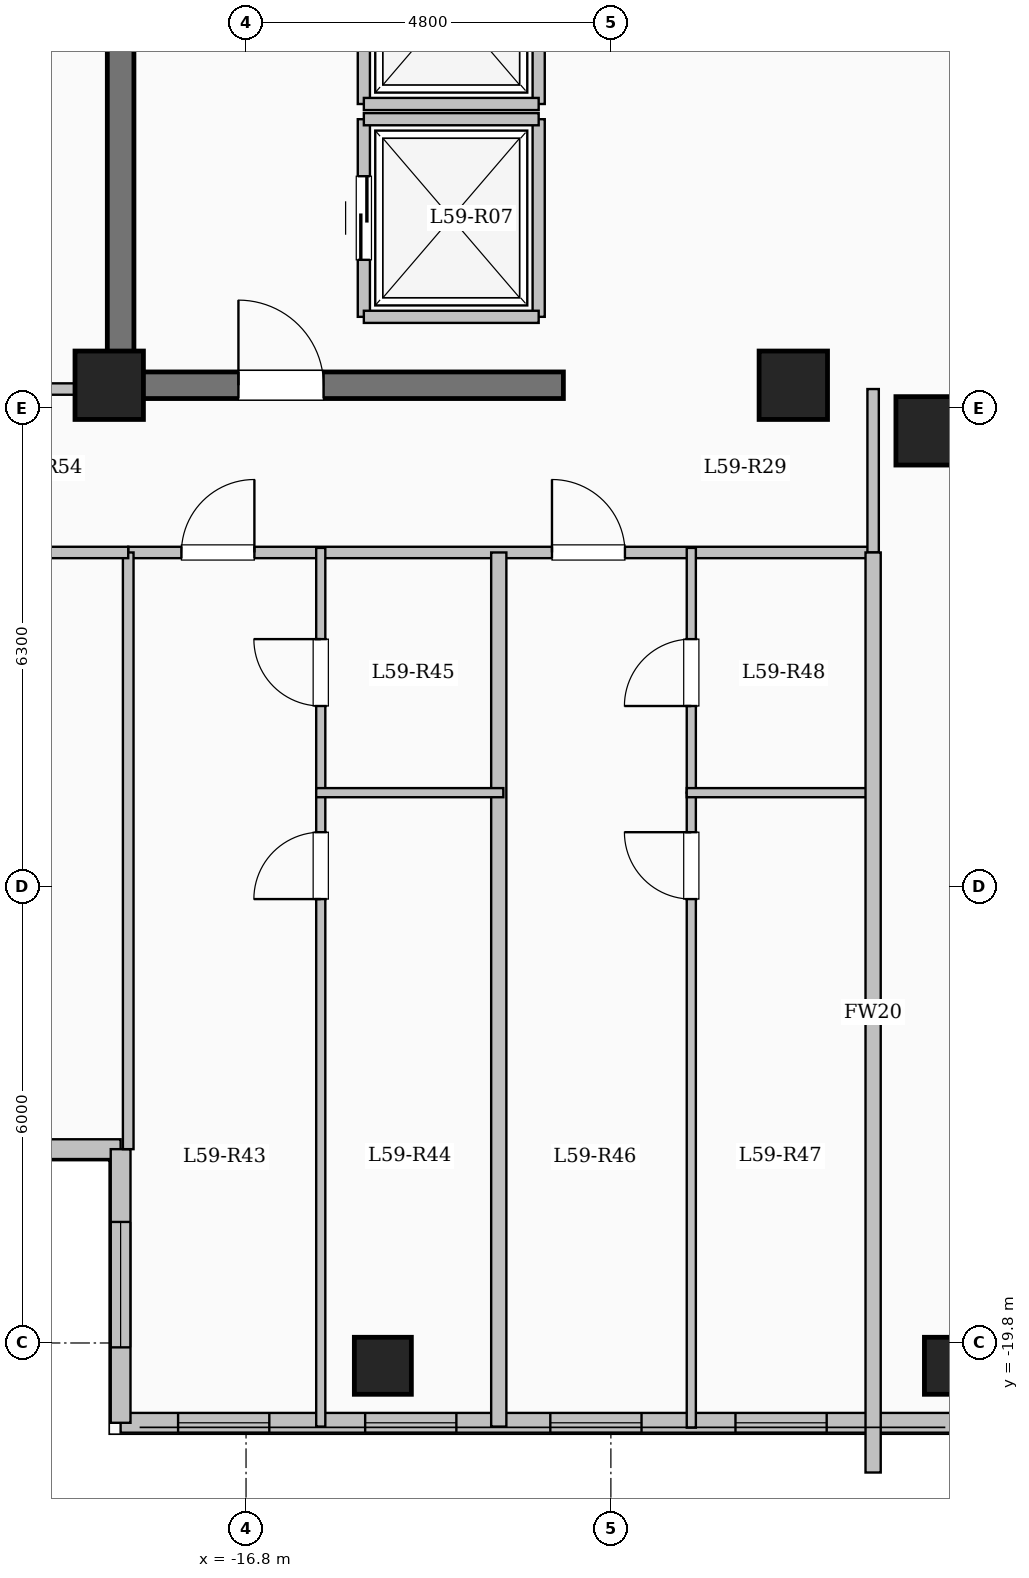
"""IFC4 building model, lengths in metres.
Left out: names, types, materials, properties, quantities, classifications, styles, units other than length and angle.
Written with IfcOpenShell. Run it as: python <this file> out.ifc"""

import sys

from ifc_helpers import new_model, si_unit, direction, frame, frame_2d, origin, origin_2d, place, context, subcontext, project, spatial, rectangle, extrude, element, fill, save


model = new_model("IFC4")
c1 = context("Model", 3, precision=1e-05, world=origin(), true_north=direction((0.0, 1.0)))
c2 = subcontext(c1, "Body", "Model", "MODEL_VIEW")
j1 = project(units=[si_unit("LENGTHUNIT", "METRE"), si_unit("PLANEANGLEUNIT", "RADIAN")], contexts=[c1])
p1 = place(None, origin())
s1 = spatial("IfcSite", under=j1, at=p1, CompositionType="ELEMENT")
p2 = place(p1, origin())
s2 = spatial("IfcBuilding", under=s1, at=p2, CompositionType="ELEMENT")
p3 = place(p2, frame((0.0, 0.0, 217.05)))
s3 = spatial("IfcBuildingStorey", under=s2, at=p3, CompositionType="ELEMENT", Elevation=217.05)
for number, where, z_axis, x_axis in (
    (1, (-7.8, -7.8, 0.0), (0.0, 0.0, 1.0), (1.0, 0.0, 0.0)),
    (2, (-9.6, -7.2, 0.0), (0.0, 0.0, 1.0), (1.0, 0.0, 0.0)),
    (3, (-18.6, -7.2, 0.0), (0.0, 0.0, 1.0), (1.0, 0.0, 0.0)),
):
    element("IfcColumn", number, at=place(p3, frame(where, z_axis=z_axis, x_axis=x_axis)), inside=s3, PredefinedType="COLUMN", context=c2, shape_type="SweptSolid", body=[
        extrude(rectangle(XDim=0.9, YDim=0.9, at=origin_2d()), origin(), (0.0, 0.0, 1.0), 3.35),
    ])
for number, where, z_axis, x_axis in (
    (4, (-15.0, -20.1, 0.0), (0.0, 0.0, 1.0), (1.0, 0.0, 0.0)),
    (5, (-7.5, -20.1, 0.0), (0.0, 0.0, 1.0), (1.0, 0.0, 0.0)),
):
    element("IfcColumn", number, at=place(p3, frame(where, z_axis=z_axis, x_axis=x_axis)), inside=s3, PredefinedType="COLUMN", context=c2, shape_type="SweptSolid", body=[
        extrude(rectangle(XDim=0.75, YDim=0.75, at=origin_2d()), origin(), (0.0, 0.0, 1.0), 3.35),
    ])
p4 = place(p3, frame((-18.45, -17.25, 0.0), z_axis=(0.0, 0.0, 1.0), x_axis=(-1.0, 0.0, 0.0)))
e6 = element("IfcWall", 6, at=p4, inside=s3, PredefinedType="SOLIDWALL", context=c2, shape_type="SweptSolid", body=[
    extrude(rectangle(XDim=5.1, YDim=0.26, at=frame_2d((2.55, 0.0))), origin(), (0.0, 0.0, 1.0), 3.1),
])
p5 = place(p4, frame((1.425, 0.0, 0.9)))
e7 = element("IfcOpeningElement", 7, at=p5, cuts=e6, PredefinedType="OPENING", context=c2, shape_type="SweptSolid", body=[
    extrude(rectangle(XDim=2.2, YDim=1.75, at=frame_2d((1.1, 0.875))), frame((0.0, 0.14, 0.0), z_axis=(0.0, -1.0, 0.0), x_axis=(1.0, 0.0, 0.0)), (0.0, 0.0, 1.0), 0.28),
])
p6 = place(p3, frame((-7.35, -20.85, 0.0), z_axis=(0.0, 0.0, 1.0), x_axis=(-1.0, 0.0, 0.0)))
e8 = element("IfcWall", 8, at=p6, inside=s3, PredefinedType="SOLIDWALL", context=c2, shape_type="SweptSolid", body=[
    extrude(rectangle(XDim=11.1, YDim=0.26, at=frame_2d((5.55, 0.0))), origin(), (0.0, 0.0, 1.0), 3.1),
])
p7 = place(p6, frame((1.811, 0.0, 0.95)))
e9 = element("IfcOpeningElement", 9, at=p7, cuts=e8, PredefinedType="OPENING", context=c2, shape_type="SweptSolid", body=[
    extrude(rectangle(XDim=1.2, YDim=1.5, at=frame_2d((0.6, 0.75))), frame((0.0, 0.14, 0.0), z_axis=(0.0, -1.0, 0.0), x_axis=(1.0, 0.0, 0.0)), (0.0, 0.0, 1.0), 0.28),
])
p8 = place(p6, frame((4.247, 0.0, 0.95)))
e10 = element("IfcOpeningElement", 10, at=p8, cuts=e8, PredefinedType="OPENING", context=c2, shape_type="SweptSolid", body=[
    extrude(rectangle(XDim=1.2, YDim=1.5, at=frame_2d((0.6, 0.75))), frame((0.0, 0.14, 0.0), z_axis=(0.0, -1.0, 0.0), x_axis=(1.0, 0.0, 0.0)), (0.0, 0.0, 1.0), 0.28),
])
p9 = place(p6, frame((6.683, 0.0, 0.95)))
e11 = element("IfcOpeningElement", 11, at=p9, cuts=e8, PredefinedType="OPENING", context=c2, shape_type="SweptSolid", body=[
    extrude(rectangle(XDim=1.2, YDim=1.5, at=frame_2d((0.6, 0.75))), frame((0.0, 0.14, 0.0), z_axis=(0.0, -1.0, 0.0), x_axis=(1.0, 0.0, 0.0)), (0.0, 0.0, 1.0), 0.28),
])
p10 = place(p6, frame((9.144, 0.0, 0.95)))
e12 = element("IfcOpeningElement", 12, at=p10, cuts=e8, PredefinedType="OPENING", context=c2, shape_type="SweptSolid", body=[
    extrude(rectangle(XDim=1.2, YDim=1.5, at=frame_2d((0.6, 0.75))), frame((0.0, 0.14, 0.0), z_axis=(0.0, -1.0, 0.0), x_axis=(1.0, 0.0, 0.0)), (0.0, 0.0, 1.0), 0.28),
])
p11 = place(p3, frame((-18.45, -20.85, 0.0), z_axis=(0.0, 0.0, 1.0), x_axis=(0.0, 1.0, 0.0)))
e13 = element("IfcWall", 13, at=p11, inside=s3, PredefinedType="SOLIDWALL", context=c2, shape_type="SweptSolid", body=[
    extrude(rectangle(XDim=3.6, YDim=0.26, at=frame_2d((1.8, 0.0))), origin(), (0.0, 0.0, 1.0), 3.1),
])
p12 = place(p11, frame((0.992, 0.0, 0.9)))
e14 = element("IfcOpeningElement", 14, at=p12, cuts=e13, PredefinedType="OPENING", context=c2, shape_type="SweptSolid", body=[
    extrude(rectangle(XDim=1.65, YDim=1.6, at=frame_2d((0.825, 0.8))), frame((0.0, 0.14, 0.0), z_axis=(0.0, -1.0, 0.0), x_axis=(1.0, 0.0, 0.0)), (0.0, 0.0, 1.0), 0.28),
])
p13 = place(p3, frame((-15.25, -6.3, 0.0), z_axis=(0.0, 0.0, 1.0), x_axis=(0.0, 1.0, 0.0)))
e15 = element("IfcWall", 15, at=p13, inside=s3, PredefinedType="SOLIDWALL", context=c2, shape_type="SweptSolid", body=[
    extrude(rectangle(XDim=2.6, YDim=0.16, at=frame_2d((1.3, 0.0))), origin(), (0.0, 0.0, 1.0), 3.1),
])
p14 = place(p13, frame((0.75, 0.0, 0.0)))
e16 = element("IfcOpeningElement", 16, at=p14, cuts=e15, PredefinedType="OPENING", context=c2, shape_type="SweptSolid", body=[
    extrude(rectangle(XDim=1.1, YDim=2.15, at=frame_2d((0.55, 1.075))), frame((0.0, 0.09, 0.0), z_axis=(0.0, -1.0, 0.0), x_axis=(1.0, 0.0, 0.0)), (0.0, 0.0, 1.0), 0.18),
])
p15 = place(p3, frame((-12.95, -6.3, 0.0), z_axis=(0.0, 0.0, 1.0), x_axis=(0.0, 1.0, 0.0)))
e17 = element("IfcWall", 17, at=p15, inside=s3, PredefinedType="SOLIDWALL", context=c2, shape_type="SweptSolid", body=[
    extrude(rectangle(XDim=2.6, YDim=0.16, at=frame_2d((1.3, 0.0))), origin(), (0.0, 0.0, 1.0), 3.1),
])
for number, where, z_axis, x_axis in (
    (18, (-15.25, -6.3, 0.0), (0.0, 0.0, 1.0), (1.0, 0.0, 0.0)),
    (19, (-15.25, -3.7, 0.0), (0.0, 0.0, 1.0), (1.0, 0.0, 0.0)),
):
    element("IfcWall", number, at=place(p3, frame(where, z_axis=z_axis, x_axis=x_axis)), inside=s3, PredefinedType="SOLIDWALL", context=c2, shape_type="SweptSolid", body=[
        extrude(rectangle(XDim=2.3, YDim=0.16, at=frame_2d((1.15, 0.0))), origin(), (0.0, 0.0, 1.0), 3.1),
    ])
p16 = place(p3, frame((-15.25, -3.5, 0.0), z_axis=(0.0, 0.0, 1.0), x_axis=(0.0, 1.0, 0.0)))
e20 = element("IfcWall", 20, at=p16, inside=s3, PredefinedType="SOLIDWALL", context=c2, shape_type="SweptSolid", body=[
    extrude(rectangle(XDim=2.6, YDim=0.16, at=frame_2d((1.3, 0.0))), origin(), (0.0, 0.0, 1.0), 3.1),
])
p17 = place(p16, frame((0.75, 0.0, 0.0)))
e21 = element("IfcOpeningElement", 21, at=p17, cuts=e20, PredefinedType="OPENING", context=c2, shape_type="SweptSolid", body=[
    extrude(rectangle(XDim=1.1, YDim=2.15, at=frame_2d((0.55, 1.075))), frame((0.0, 0.09, 0.0), z_axis=(0.0, -1.0, 0.0), x_axis=(1.0, 0.0, 0.0)), (0.0, 0.0, 1.0), 0.18),
])
p18 = place(p3, frame((-12.95, -3.5, 0.0), z_axis=(0.0, 0.0, 1.0), x_axis=(0.0, 1.0, 0.0)))
e22 = element("IfcWall", 22, at=p18, inside=s3, PredefinedType="SOLIDWALL", context=c2, shape_type="SweptSolid", body=[
    extrude(rectangle(XDim=2.6, YDim=0.16, at=frame_2d((1.3, 0.0))), origin(), (0.0, 0.0, 1.0), 3.1),
])
p19 = place(p3, frame((-15.25, -3.5, 0.0), z_axis=(0.0, 0.0, 1.0), x_axis=(1.0, 0.0, 0.0)))
e23 = element("IfcWall", 23, at=p19, inside=s3, PredefinedType="SOLIDWALL", context=c2, shape_type="SweptSolid", body=[
    extrude(rectangle(XDim=2.3, YDim=0.16, at=frame_2d((1.15, 0.0))), origin(), (0.0, 0.0, 1.0), 3.1),
])
p20 = place(p3, frame((-18.45, -7.375, 0.0), z_axis=(0.0, 0.0, 1.0), x_axis=(0.0, 1.0, 0.0)))
e24 = element("IfcWall", 24, at=p20, inside=s3, PredefinedType="SHEAR", context=c2, shape_type="SweptSolid", body=[
    extrude(rectangle(XDim=14.05, YDim=0.35, at=frame_2d((7.025, 0.0))), origin(), (0.0, 0.0, 1.0), 3.35),
])
p21 = place(p3, frame((-18.625, -7.2, 0.0), z_axis=(0.0, 0.0, 1.0), x_axis=(1.0, 0.0, 0.0)))
e25 = element("IfcWall", 25, at=p21, inside=s3, PredefinedType="SHEAR", context=c2, shape_type="SweptSolid", body=[
    extrude(rectangle(XDim=6.0, YDim=0.35, at=frame_2d((3.0, 0.0))), origin(), (0.0, 0.0, 1.0), 3.35),
])
p22 = place(p21, frame((1.725, 0.0, 0.0)))
e26 = element("IfcOpeningElement", 26, at=p22, cuts=e25, PredefinedType="OPENING", context=c2, shape_type="SweptSolid", body=[
    extrude(rectangle(XDim=1.12, YDim=2.15, at=frame_2d((0.56, 1.075))), frame((0.0, 0.185, 0.0), z_axis=(0.0, -1.0, 0.0), x_axis=(1.0, 0.0, 0.0)), (0.0, 0.0, 1.0), 0.37),
])
p23 = place(p3, frame((-18.35, -9.4, 0.0), z_axis=(0.0, 0.0, 1.0), x_axis=(1.0, 0.0, 0.0)))
e27 = element("IfcWall", 27, at=p23, inside=s3, PredefinedType="PARTITIONING", context=c2, shape_type="SweptSolid", body=[
    extrude(rectangle(XDim=9.8, YDim=0.15, at=frame_2d((4.9, 0.0))), origin(), (0.0, 0.0, 1.0), 3.1),
])
p24 = place(p23, frame((0.7, 0.0, 0.0)))
e28 = element("IfcOpeningElement", 28, at=p24, cuts=e27, PredefinedType="OPENING", context=c2, shape_type="SweptSolid", body=[
    extrude(rectangle(XDim=0.96, YDim=2.15, at=frame_2d((0.48, 1.075))), frame((0.0, 0.085, 0.0), z_axis=(0.0, -1.0, 0.0), x_axis=(1.0, 0.0, 0.0)), (0.0, 0.0, 1.0), 0.17),
])
p25 = place(p23, frame((5.575, 0.0, 0.0)))
e29 = element("IfcOpeningElement", 29, at=p25, cuts=e27, PredefinedType="OPENING", context=c2, shape_type="SweptSolid", body=[
    extrude(rectangle(XDim=0.96, YDim=2.15, at=frame_2d((0.48, 1.075))), frame((0.0, 0.085, 0.0), z_axis=(0.0, -1.0, 0.0), x_axis=(1.0, 0.0, 0.0)), (0.0, 0.0, 1.0), 0.17),
])
p26 = place(p3, frame((-8.55, -9.4, 0.0), z_axis=(0.0, 0.0, 1.0), x_axis=(0.0, 1.0, 0.0)))
e30 = element("IfcWall", 30, at=p26, inside=s3, PredefinedType="PARTITIONING", context=c2, shape_type="SweptSolid", body=[
    extrude(rectangle(XDim=2.15, YDim=0.15, at=frame_2d((1.075, 0.0))), origin(), (0.0, 0.0, 1.0), 3.1),
])
p27 = place(p3, frame((-13.475, -20.9, 0.0), z_axis=(0.0, 0.0, 1.0), x_axis=(0.0, 1.0, 0.0)))
e31 = element("IfcWall", 31, at=p27, inside=s3, PredefinedType="SOLIDWALL", context=c2, shape_type="SweptSolid", body=[
    extrude(rectangle(XDim=11.5, YDim=0.2, at=frame_2d((5.75, 0.0))), origin(), (0.0, 0.0, 1.0), 3.1),
])
p28 = place(p3, frame((-15.817, -20.9, 0.0), z_axis=(0.0, 0.0, 1.0), x_axis=(0.0, 1.0, 0.0)))
e32 = element("IfcWall", 32, at=p28, inside=s3, PredefinedType="PARTITIONING", context=c2, shape_type="SweptSolid", body=[
    extrude(rectangle(XDim=8.34, YDim=0.12, at=frame_2d((4.17, 0.0))), origin(), (0.0, 0.0, 1.0), 3.1),
])
p29 = place(p28, frame((6.94, 0.0, 0.0)))
e33 = element("IfcOpeningElement", 33, at=p29, cuts=e32, PredefinedType="OPENING", context=c2, shape_type="SweptSolid", body=[
    extrude(rectangle(XDim=0.88, YDim=2.1, at=frame_2d((0.44, 1.05))), frame((0.0, 0.07, 0.0), z_axis=(0.0, -1.0, 0.0), x_axis=(1.0, 0.0, 0.0)), (0.0, 0.0, 1.0), 0.14),
])
p30 = place(p3, frame((-15.817, -12.56, 0.0), z_axis=(0.0, 0.0, 1.0), x_axis=(0.0, 1.0, 0.0)))
e34 = element("IfcWall", 34, at=p30, inside=s3, PredefinedType="PARTITIONING", context=c2, shape_type="SweptSolid", body=[
    extrude(rectangle(XDim=3.22, YDim=0.12, at=frame_2d((1.61, 0.0))), origin(), (0.0, 0.0, 1.0), 3.1),
])
p31 = place(p30, frame((1.14, 0.0, 0.0)))
e35 = element("IfcOpeningElement", 35, at=p31, cuts=e34, PredefinedType="OPENING", context=c2, shape_type="SweptSolid", body=[
    extrude(rectangle(XDim=0.88, YDim=2.1, at=frame_2d((0.44, 1.05))), frame((0.0, 0.07, 0.0), z_axis=(0.0, -1.0, 0.0), x_axis=(1.0, 0.0, 0.0)), (0.0, 0.0, 1.0), 0.14),
])
p32 = place(p3, frame((-15.877, -12.56, 0.0), z_axis=(0.0, 0.0, 1.0), x_axis=(1.0, 0.0, 0.0)))
e36 = element("IfcWall", 36, at=p32, inside=s3, PredefinedType="PARTITIONING", context=c2, shape_type="SweptSolid", body=[
    extrude(rectangle(XDim=2.462, YDim=0.12, at=frame_2d((1.231, 0.0))), origin(), (0.0, 0.0, 1.0), 2.725),
])
p33 = place(p3, frame((-10.942, -20.914, 0.0), z_axis=(0.0, 0.0, 1.0), x_axis=(0.0, 1.0, 0.0)))
e37 = element("IfcWall", 37, at=p33, inside=s3, PredefinedType="PARTITIONING", context=c2, shape_type="SweptSolid", body=[
    extrude(rectangle(XDim=8.354, YDim=0.12, at=frame_2d((4.177, 0.0))), origin(), (0.0, 0.0, 1.0), 3.1),
])
p34 = place(p33, frame((6.954, 0.0, 0.0)))
e38 = element("IfcOpeningElement", 38, at=p34, cuts=e37, PredefinedType="OPENING", context=c2, shape_type="SweptSolid", body=[
    extrude(rectangle(XDim=0.88, YDim=2.1, at=frame_2d((0.44, 1.05))), frame((0.0, 0.07, 0.0), z_axis=(0.0, -1.0, 0.0), x_axis=(1.0, 0.0, 0.0)), (0.0, 0.0, 1.0), 0.14),
])
p35 = place(p3, frame((-10.942, -12.56, 0.0), z_axis=(0.0, 0.0, 1.0), x_axis=(0.0, 1.0, 0.0)))
e39 = element("IfcWall", 39, at=p35, inside=s3, PredefinedType="PARTITIONING", context=c2, shape_type="SweptSolid", body=[
    extrude(rectangle(XDim=3.22, YDim=0.12, at=frame_2d((1.61, 0.0))), origin(), (0.0, 0.0, 1.0), 3.1),
])
p36 = place(p35, frame((1.14, 0.0, 0.0)))
e40 = element("IfcOpeningElement", 40, at=p36, cuts=e39, PredefinedType="OPENING", context=c2, shape_type="SweptSolid", body=[
    extrude(rectangle(XDim=0.88, YDim=2.1, at=frame_2d((0.44, 1.05))), frame((0.0, 0.07, 0.0), z_axis=(0.0, -1.0, 0.0), x_axis=(1.0, 0.0, 0.0)), (0.0, 0.0, 1.0), 0.14),
])
p37 = place(p3, frame((-11.002, -12.56, 0.0), z_axis=(0.0, 0.0, 1.0), x_axis=(1.0, 0.0, 0.0)))
e41 = element("IfcWall", 41, at=p37, inside=s3, PredefinedType="PARTITIONING", context=c2, shape_type="SweptSolid", body=[
    extrude(rectangle(XDim=2.462, YDim=0.12, at=frame_2d((1.231, 0.0))), origin(), (0.0, 0.0, 1.0), 2.725),
])
p38 = place(p3, frame((-8.55, -21.504, 0.0), z_axis=(0.0, 0.0, 1.0), x_axis=(0.0, 1.0, 0.0)))
e42 = element("IfcWall", 42, at=p38, inside=s3, PredefinedType="SOLIDWALL", context=c2, shape_type="SweptSolid", body=[
    extrude(rectangle(XDim=12.104, YDim=0.2, at=frame_2d((6.052, 0.0))), origin(), (0.0, 0.0, 1.0), 3.1),
])
p39 = place(p3, frame((-23.58, -7.25, 0.0), z_axis=(0.0, 0.0, 1.0), x_axis=(1.0, 0.0, 0.0)))
e43 = element("IfcWall", 43, at=p39, inside=s3, PredefinedType="PARTITIONING", context=c2, shape_type="SweptSolid", body=[
    extrude(rectangle(XDim=5.13, YDim=0.15, at=frame_2d((2.565, 0.0))), origin(), (0.0, 0.0, 1.0), 3.1),
])
p40 = place(p39, frame((2.08, 0.0, 0.0)))
e44 = element("IfcOpeningElement", 44, at=p40, cuts=e43, PredefinedType="OPENING", context=c2, shape_type="SweptSolid", body=[
    extrude(rectangle(XDim=1.08, YDim=2.15, at=frame_2d((0.54, 1.075))), frame((0.0, 0.085, 0.0), z_axis=(0.0, -1.0, 0.0), x_axis=(1.0, 0.0, 0.0)), (0.0, 0.0, 1.0), 0.17),
])
p41 = place(p3, frame((-18.35, -17.25, 0.0), z_axis=(0.0, 0.0, 1.0), x_axis=(0.0, 1.0, 0.0)))
e45 = element("IfcWall", 45, at=p41, inside=s3, PredefinedType="PARTITIONING", context=c2, shape_type="SweptSolid", body=[
    extrude(rectangle(XDim=7.85, YDim=0.14, at=frame_2d((3.925, 0.0))), origin(), (0.0, 0.0, 1.0), 3.1),
])
p42 = place(p3, frame((-23.58, -9.4, 0.0), z_axis=(0.0, 0.0, 1.0), x_axis=(1.0, 0.0, 0.0)))
e46 = element("IfcWall", 46, at=p42, inside=s3, PredefinedType="PARTITIONING", context=c2, shape_type="SweptSolid", body=[
    extrude(rectangle(XDim=5.23, YDim=0.15, at=frame_2d((2.615, 0.0))), origin(), (0.0, 0.0, 1.0), 3.1),
])
p43 = place(p42, frame((2.14, 0.0, 0.0)))
e47 = element("IfcOpeningElement", 47, at=p43, cuts=e46, PredefinedType="OPENING", context=c2, shape_type="SweptSolid", body=[
    extrude(rectangle(XDim=0.95, YDim=2.15, at=frame_2d((0.475, 1.075))), frame((0.0, 0.085, 0.0), z_axis=(0.0, -1.0, 0.0), x_axis=(1.0, 0.0, 0.0)), (0.0, 0.0, 1.0), 0.17),
])
p44 = place(p7, origin())
e48 = element("IfcWindow", 48, at=p44, inside=s3, PartitioningType="SINGLE_PANEL", PredefinedType="WINDOW", context=c2, shape_type="SweptSolid", body=[
    extrude(rectangle(XDim=1.2, YDim=1.5, at=frame_2d((0.6, 0.75))), frame((0.0, 0.03, 0.0), z_axis=(0.0, -1.0, 0.0), x_axis=(1.0, 0.0, 0.0)), (0.0, 0.0, 1.0), 0.06),
])
fill(e9, e48)
p45 = place(p8, origin())
e49 = element("IfcWindow", 49, at=p45, inside=s3, PartitioningType="SINGLE_PANEL", PredefinedType="WINDOW", context=c2, shape_type="SweptSolid", body=[
    extrude(rectangle(XDim=1.2, YDim=1.5, at=frame_2d((0.6, 0.75))), frame((0.0, 0.03, 0.0), z_axis=(0.0, -1.0, 0.0), x_axis=(1.0, 0.0, 0.0)), (0.0, 0.0, 1.0), 0.06),
])
fill(e10, e49)
p46 = place(p9, origin())
e50 = element("IfcWindow", 50, at=p46, inside=s3, PartitioningType="SINGLE_PANEL", PredefinedType="WINDOW", context=c2, shape_type="SweptSolid", body=[
    extrude(rectangle(XDim=1.2, YDim=1.5, at=frame_2d((0.6, 0.75))), frame((0.0, 0.03, 0.0), z_axis=(0.0, -1.0, 0.0), x_axis=(1.0, 0.0, 0.0)), (0.0, 0.0, 1.0), 0.06),
])
fill(e11, e50)
p47 = place(p10, origin())
e51 = element("IfcWindow", 51, at=p47, inside=s3, PartitioningType="SINGLE_PANEL", PredefinedType="WINDOW", context=c2, shape_type="SweptSolid", body=[
    extrude(rectangle(XDim=1.2, YDim=1.5, at=frame_2d((0.6, 0.75))), frame((0.0, 0.03, 0.0), z_axis=(0.0, -1.0, 0.0), x_axis=(1.0, 0.0, 0.0)), (0.0, 0.0, 1.0), 0.06),
])
fill(e12, e51)
p48 = place(p12, origin())
e52 = element("IfcWindow", 52, at=p48, inside=s3, PartitioningType="SINGLE_PANEL", PredefinedType="WINDOW", context=c2, shape_type="SweptSolid", body=[
    extrude(rectangle(XDim=1.65, YDim=1.6, at=frame_2d((0.825, 0.8))), frame((0.0, 0.03, 0.0), z_axis=(0.0, -1.0, 0.0), x_axis=(1.0, 0.0, 0.0)), (0.0, 0.0, 1.0), 0.06),
])
fill(e14, e52)
p49 = place(p14, origin())
e53 = element("IfcDoor", 53, at=p49, inside=s3, OperationType="SLIDING_TO_LEFT", PredefinedType="DOOR", context=c2, shape_type="SweptSolid", body=[
    extrude(rectangle(XDim=1.1, YDim=2.15, at=frame_2d((0.55, 1.075))), frame((0.0, 0.025, 0.0), z_axis=(0.0, -1.0, 0.0), x_axis=(1.0, 0.0, 0.0)), (0.0, 0.0, 1.0), 0.05),
])
fill(e16, e53)
p50 = place(p22, origin())
e54 = element("IfcDoor", 54, at=p50, inside=s3, OperationType="SINGLE_SWING_LEFT", PredefinedType="DOOR", context=c2, shape_type="SweptSolid", body=[
    extrude(rectangle(XDim=1.12, YDim=2.15, at=frame_2d((0.56, 1.075))), frame((0.0, 0.025, 0.0), z_axis=(0.0, -1.0, 0.0), x_axis=(1.0, 0.0, 0.0)), (0.0, 0.0, 1.0), 0.05),
])
fill(e26, e54)
p51 = place(p24, origin())
e55 = element("IfcDoor", 55, at=p51, inside=s3, OperationType="SINGLE_SWING_RIGHT", PredefinedType="DOOR", context=c2, shape_type="SweptSolid", body=[
    extrude(rectangle(XDim=0.96, YDim=2.15, at=frame_2d((0.48, 1.075))), frame((0.0, 0.025, 0.0), z_axis=(0.0, -1.0, 0.0), x_axis=(1.0, 0.0, 0.0)), (0.0, 0.0, 1.0), 0.05),
])
fill(e28, e55)
p52 = place(p29, origin())
e56 = element("IfcDoor", 56, at=p52, inside=s3, OperationType="SINGLE_SWING_LEFT", PredefinedType="DOOR", context=c2, shape_type="SweptSolid", body=[
    extrude(rectangle(XDim=0.88, YDim=2.1, at=frame_2d((0.44, 1.05))), frame((0.0, 0.025, 0.0), z_axis=(0.0, -1.0, 0.0), x_axis=(1.0, 0.0, 0.0)), (0.0, 0.0, 1.0), 0.05),
])
fill(e33, e56)
p53 = place(p31, origin())
e57 = element("IfcDoor", 57, at=p53, inside=s3, OperationType="SINGLE_SWING_RIGHT", PredefinedType="DOOR", context=c2, shape_type="SweptSolid", body=[
    extrude(rectangle(XDim=0.88, YDim=2.1, at=frame_2d((0.44, 1.05))), frame((0.0, 0.025, 0.0), z_axis=(0.0, -1.0, 0.0), x_axis=(1.0, 0.0, 0.0)), (0.0, 0.0, 1.0), 0.05),
])
fill(e35, e57)
p54 = place(p25, origin())
e58 = element("IfcDoor", 58, at=p54, inside=s3, OperationType="SINGLE_SWING_LEFT", PredefinedType="DOOR", context=c2, shape_type="SweptSolid", body=[
    extrude(rectangle(XDim=0.96, YDim=2.15, at=frame_2d((0.48, 1.075))), frame((0.0, 0.025, 0.0), z_axis=(0.0, -1.0, 0.0), x_axis=(1.0, 0.0, 0.0)), (0.0, 0.0, 1.0), 0.05),
])
fill(e29, e58)
p55 = place(p34, origin())
e59 = element("IfcDoor", 59, at=p55, inside=s3, OperationType="SINGLE_SWING_RIGHT", PredefinedType="DOOR", context=c2, shape_type="SweptSolid", body=[
    extrude(rectangle(XDim=0.88, YDim=2.1, at=frame_2d((0.44, 1.05))), frame((0.0, 0.025, 0.0), z_axis=(0.0, -1.0, 0.0), x_axis=(1.0, 0.0, 0.0)), (0.0, 0.0, 1.0), 0.05),
])
fill(e38, e59)
p56 = place(p36, origin())
e60 = element("IfcDoor", 60, at=p56, inside=s3, OperationType="SINGLE_SWING_LEFT", PredefinedType="DOOR", context=c2, shape_type="SweptSolid", body=[
    extrude(rectangle(XDim=0.88, YDim=2.1, at=frame_2d((0.44, 1.05))), frame((0.0, 0.025, 0.0), z_axis=(0.0, -1.0, 0.0), x_axis=(1.0, 0.0, 0.0)), (0.0, 0.0, 1.0), 0.05),
])
fill(e40, e60)
save(model, sys.argv[1])
